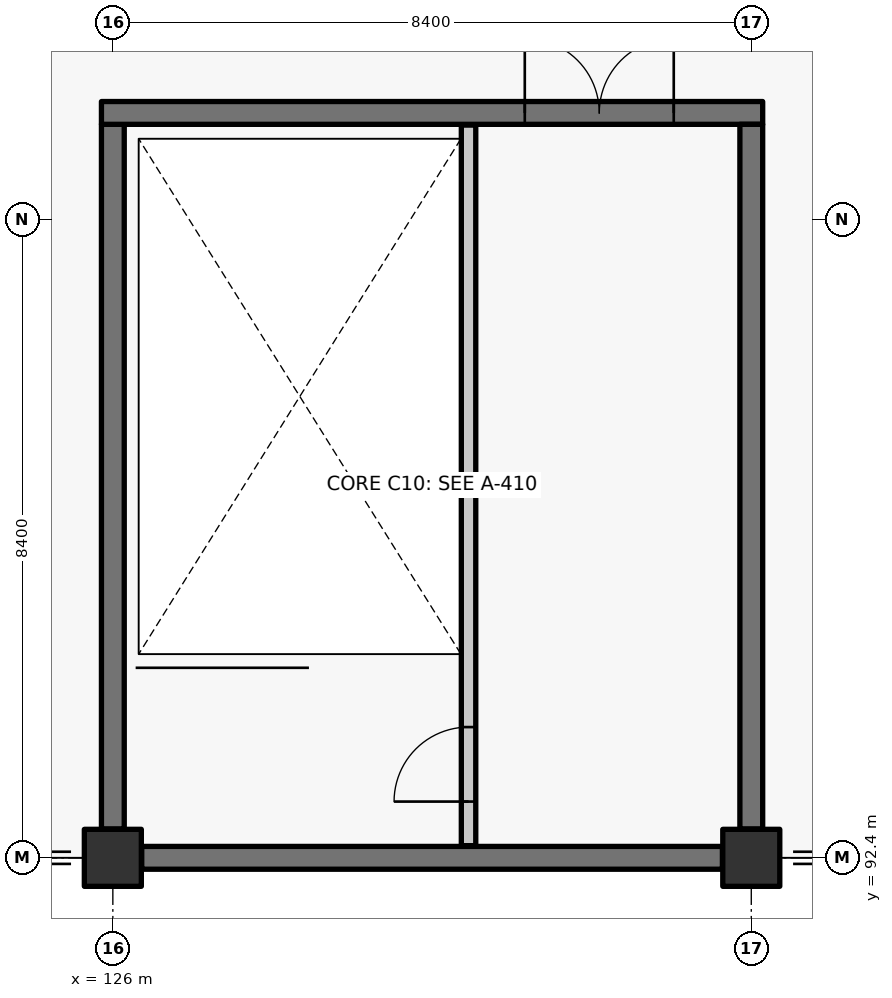
"""IFC4 building model, lengths in metres.
Left out: names, types, materials, properties, quantities, classifications, styles, units other than length and angle.
Written with IfcOpenShell. Run it as: python <this file> out.ifc"""

import sys

from ifc_helpers import new_model, si_unit, direction, frame, frame_2d, origin, origin_2d, place, context, subcontext, project, spatial, rectangle, extrude, element, fill, save


model = new_model("IFC4")
c1 = context("Model", 3, precision=1e-05, world=origin(), true_north=direction((0.0, 1.0)))
c2 = subcontext(c1, "Body", "Model", "MODEL_VIEW")
j1 = project(units=[si_unit("LENGTHUNIT", "METRE"), si_unit("PLANEANGLEUNIT", "RADIAN")], contexts=[c1])
p1 = place(None, origin())
s1 = spatial("IfcSite", under=j1, at=p1, CompositionType="ELEMENT")
p2 = place(p1, origin())
s2 = spatial("IfcBuilding", under=s1, at=p2, CompositionType="ELEMENT")
p3 = place(p2, frame((0.0, 0.0, 6.0)))
s3 = spatial("IfcBuildingStorey", under=s2, at=p3, CompositionType="ELEMENT", Elevation=6.0)
for number, where, z_axis, x_axis in (
    (1, (126.0, 92.4, 0.0), (0.0, 0.0, 1.0), (1.0, 0.0, 0.0)),
    (2, (134.4, 92.4, 0.0), (0.0, 0.0, 1.0), (1.0, 0.0, 0.0)),
):
    element("IfcColumn", number, at=place(p3, frame(where, z_axis=z_axis, x_axis=x_axis)), inside=s3, PredefinedType="COLUMN", context=c2, shape_type="SweptSolid", body=[
        extrude(rectangle(XDim=0.75, YDim=0.75, at=origin_2d()), origin(), (0.0, 0.0, 1.0), 8.64),
    ])
p4 = place(p3, frame((134.02, 92.4, 0.0), z_axis=(0.0, 0.0, 1.0), x_axis=(-1.0, 0.0, 0.0)))
e3 = element("IfcWall", 3, at=p4, inside=s3, PredefinedType="SHEAR", context=c2, shape_type="SweptSolid", body=[
    extrude(rectangle(XDim=7.64, YDim=0.3, at=frame_2d((3.82, 0.0))), origin(), (0.0, 0.0, 1.0), 5.12),
])
p5 = place(p3, frame((126.0, 92.78, 0.0), z_axis=(0.0, 0.0, 1.0), x_axis=(0.0, 1.0, 0.0)))
e4 = element("IfcWall", 4, at=p5, inside=s3, PredefinedType="SHEAR", context=c2, shape_type="SweptSolid", body=[
    extrude(rectangle(XDim=9.27, YDim=0.3, at=frame_2d((4.635, 0.0))), origin(), (0.0, 0.0, 1.0), 5.12),
])
p6 = place(p3, frame((125.85, 102.2, 0.0), z_axis=(0.0, 0.0, 1.0), x_axis=(1.0, 0.0, 0.0)))
e5 = element("IfcWall", 5, at=p6, inside=s3, PredefinedType="SHEAR", context=c2, shape_type="SweptSolid", body=[
    extrude(rectangle(XDim=8.7, YDim=0.3, at=frame_2d((4.35, 0.0))), origin(), (0.0, 0.0, 1.0), 5.12),
])
p7 = place(p6, frame((5.57, 0.0, 0.0)))
e6 = element("IfcOpeningElement", 6, at=p7, cuts=e5, PredefinedType="OPENING", context=c2, shape_type="SweptSolid", body=[
    extrude(rectangle(XDim=1.96, YDim=2.2, at=frame_2d((0.98, 1.1))), frame((0.0, 0.16, 0.0), z_axis=(0.0, -1.0, 0.0), x_axis=(1.0, 0.0, 0.0)), (0.0, 0.0, 1.0), 0.32),
])
p8 = place(p3, frame((134.4, 102.05, 0.0), z_axis=(0.0, 0.0, 1.0), x_axis=(0.0, -1.0, 0.0)))
e7 = element("IfcWall", 7, at=p8, inside=s3, PredefinedType="SHEAR", context=c2, shape_type="SweptSolid", body=[
    extrude(rectangle(XDim=9.27, YDim=0.3, at=frame_2d((4.635, 0.0))), origin(), (0.0, 0.0, 1.0), 5.12),
])
p9 = place(p3, frame((130.68, 92.56, 0.0), z_axis=(0.0, 0.0, 1.0), x_axis=(0.0, 1.0, 0.0)))
e8 = element("IfcWall", 8, at=p9, inside=s3, PredefinedType="SOLIDWALL", context=c2, shape_type="SweptSolid", body=[
    extrude(rectangle(XDim=9.48, YDim=0.19, at=frame_2d((4.74, 0.0))), origin(), (0.0, 0.0, 1.0), 5.12),
])
p10 = place(p9, frame((0.58, 0.0, 0.0)))
e9 = element("IfcOpeningElement", 9, at=p10, cuts=e8, PredefinedType="OPENING", context=c2, shape_type="SweptSolid", body=[
    extrude(rectangle(XDim=0.98, YDim=2.15, at=frame_2d((0.49, 1.075))), frame((0.0, 0.105, 0.0), z_axis=(0.0, -1.0, 0.0), x_axis=(1.0, 0.0, 0.0)), (0.0, 0.0, 1.0), 0.21),
])
p11 = place(p10, origin())
e10 = element("IfcDoor", 10, at=p11, inside=s3, OperationType="SINGLE_SWING_LEFT", PredefinedType="DOOR", context=c2, shape_type="SweptSolid", body=[
    extrude(rectangle(XDim=0.98, YDim=2.15, at=frame_2d((0.49, 1.075))), frame((0.0, 0.025, 0.0), z_axis=(0.0, -1.0, 0.0), x_axis=(1.0, 0.0, 0.0)), (0.0, 0.0, 1.0), 0.05),
])
fill(e9, e10)
p12 = place(p7, origin())
e11 = element("IfcDoor", 11, at=p12, inside=s3, OperationType="DOUBLE_DOOR_SINGLE_SWING", PredefinedType="DOOR", context=c2, shape_type="SweptSolid", body=[
    extrude(rectangle(XDim=1.96, YDim=2.2, at=frame_2d((0.98, 1.1))), frame((0.0, 0.025, 0.0), z_axis=(0.0, -1.0, 0.0), x_axis=(1.0, 0.0, 0.0)), (0.0, 0.0, 1.0), 0.05),
])
fill(e6, e11)
save(model, sys.argv[1])
